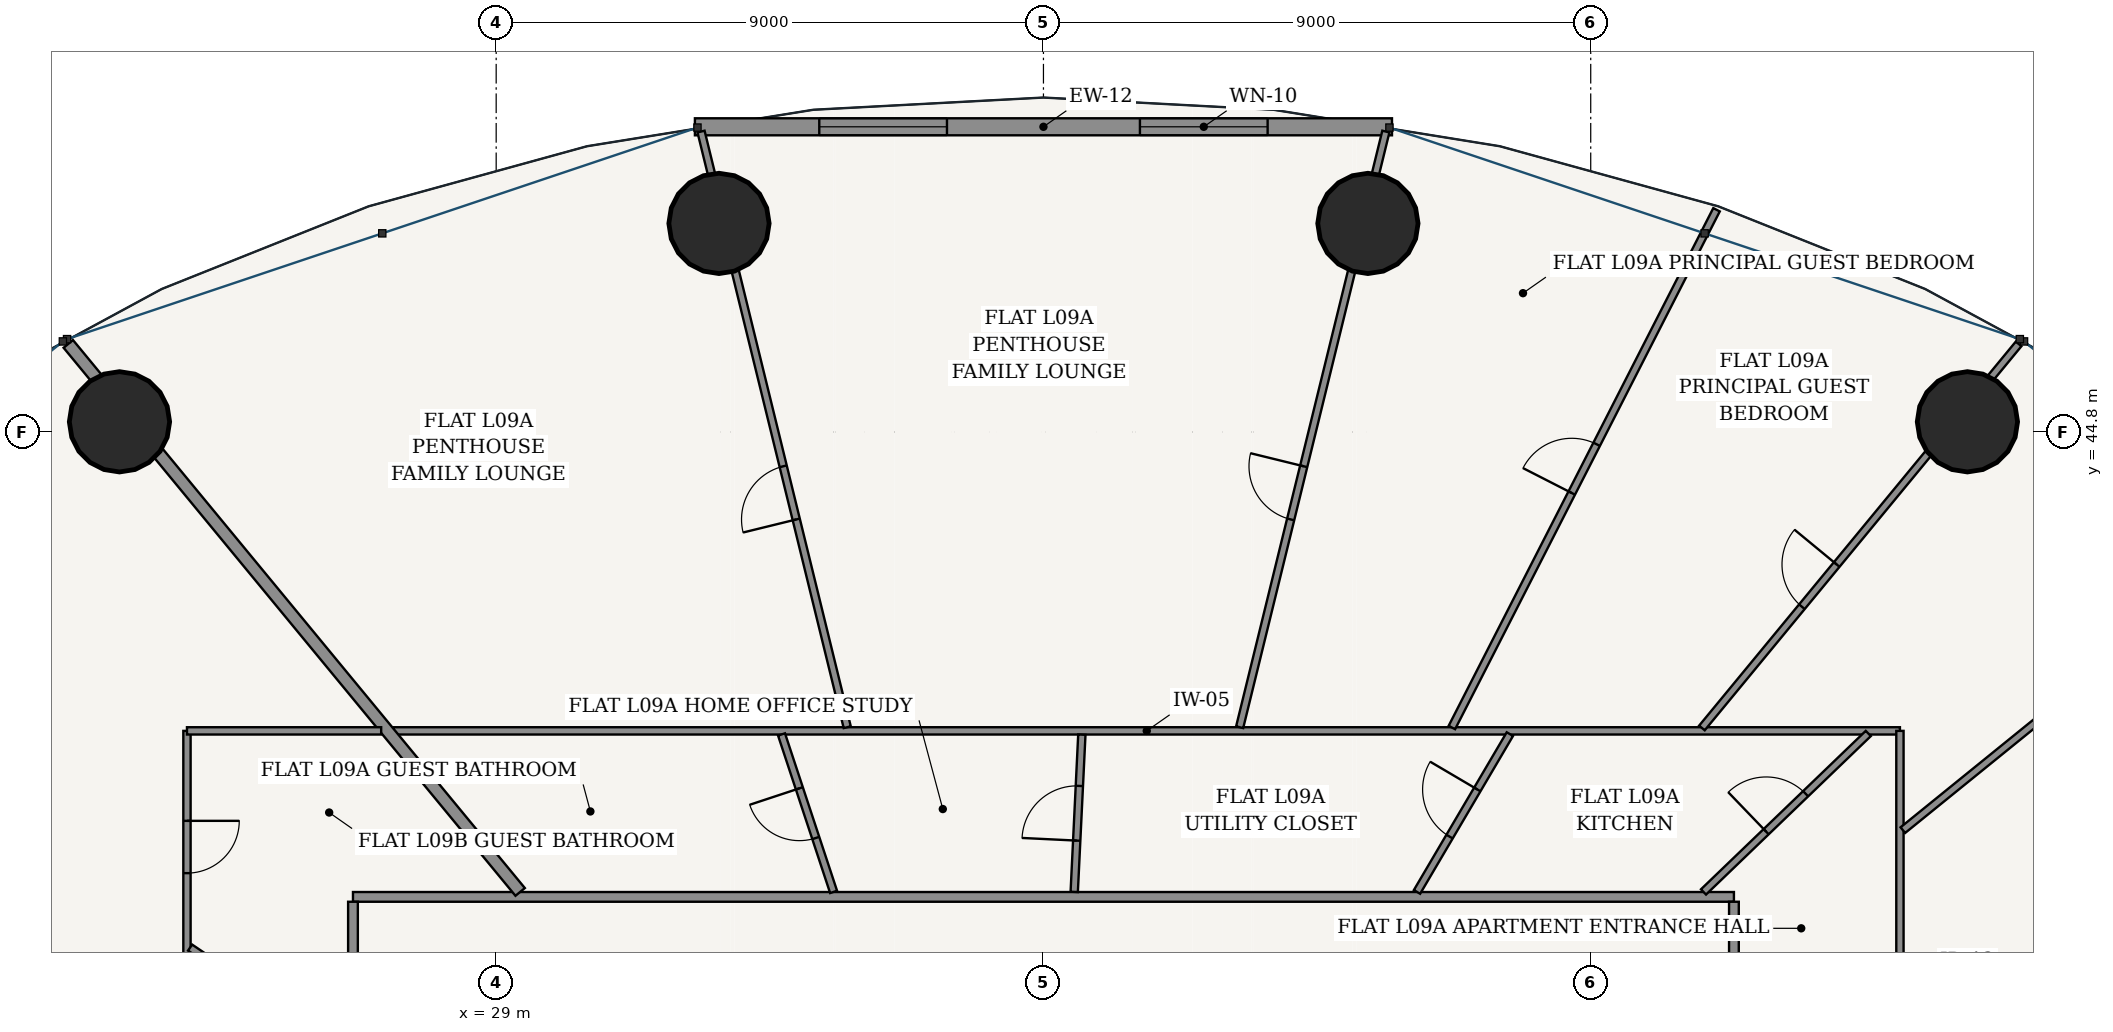
"""IFC4 building model, lengths in metres.
Left out: names, types, materials, properties, quantities, classifications, styles, units other than length and angle.
Written with IfcOpenShell. Run it as: python <this file> out.ifc"""

import sys

from ifc_helpers import new_model, si_unit, direction, frame, frame_2d, origin, origin_2d, place, context, subcontext, project, spatial, rectangle, hollow_circle, extrude, source, transform, mapped, element, fill, save


model = new_model("IFC4")
c1 = context("Model", 3, precision=1e-05, world=origin(), true_north=direction((-0.2419218956, 0.970295726276)))
c2 = subcontext(c1, "Body", "Model", "MODEL_VIEW")
j1 = project(units=[si_unit("LENGTHUNIT", "METRE"), si_unit("PLANEANGLEUNIT", "RADIAN")], contexts=[c1])
p1 = place(None, origin())
s1 = spatial("IfcSite", under=j1, at=p1, CompositionType="ELEMENT")
p2 = place(p1, origin())
s2 = spatial("IfcBuilding", under=s1, at=p2, CompositionType="ELEMENT")
p3 = place(p2, frame((0.0, 0.0, 38.4)))
s3 = spatial("IfcBuildingStorey", under=s2, at=p3, CompositionType="ELEMENT", Elevation=38.4)
for number, where, z_axis, x_axis in (
    (1, (53.195, 44.968, 0.0), (0.0, 0.0, 1.0), (1.0, 0.0, 0.0)),
    (2, (43.336, 48.23, 0.0), (0.0, 0.0, 1.0), (1.0, 0.0, 0.0)),
    (3, (32.664, 48.23, 0.0), (0.0, 0.0, 1.0), (1.0, 0.0, 0.0)),
    (4, (22.805, 44.968, 0.0), (0.0, 0.0, 1.0), (1.0, 0.0, 0.0)),
):
    element("IfcColumn", number, at=place(p3, frame(where, z_axis=z_axis, x_axis=x_axis)), inside=s3, PredefinedType="COLUMN", context=c2, shape_type="SweptSolid", body=[
        extrude(hollow_circle(Radius=0.825, WallThickness=0.05, at=origin_2d()), origin(), (0.0, 0.0, 1.0), 3.6),
    ])
p4 = place(p3, frame((43.732, 49.819, 0.0), z_axis=(0.0, 0.0, 1.0), x_axis=(-1.0, 0.0, 0.0)))
e5 = element("IfcWall", 5, at=p4, inside=s3, PredefinedType="SOLIDWALL", context=c2, shape_type="SweptSolid", body=[
    extrude(rectangle(XDim=11.463, YDim=0.28, at=frame_2d((5.732, 0.0))), origin(), (0.0, 0.0, 1.0), 3.32),
])
p5 = place(p4, frame((2.045, 0.0, 0.85)))
e6 = element("IfcOpeningElement", 6, at=p5, cuts=e5, PredefinedType="OPENING", context=c2, shape_type="SweptSolid", body=[
    extrude(rectangle(XDim=2.1, YDim=1.95, at=frame_2d((1.05, 0.975))), frame((0.0, 0.15, 0.0), z_axis=(0.0, -1.0, 0.0), x_axis=(1.0, 0.0, 0.0)), (0.0, 0.0, 1.0), 0.3),
])
p6 = place(p4, frame((7.318, 0.0, 0.85)))
e7 = element("IfcOpeningElement", 7, at=p6, cuts=e5, PredefinedType="OPENING", context=c2, shape_type="SweptSolid", body=[
    extrude(rectangle(XDim=2.1, YDim=1.95, at=frame_2d((1.05, 0.975))), frame((0.0, 0.15, 0.0), z_axis=(0.0, -1.0, 0.0), x_axis=(1.0, 0.0, 0.0)), (0.0, 0.0, 1.0), 0.3),
])
p7 = place(p3, frame((26.645, 37.155, 0.0), z_axis=(0.0, 0.0, 1.0), x_axis=(1.0, 0.0, 0.0)))
e8 = element("IfcWall", 8, at=p7, inside=s3, PredefinedType="PARTITIONING", context=c2, shape_type="SweptSolid", body=[
    extrude(rectangle(XDim=22.71, YDim=0.16, at=frame_2d((11.355, 0.0))), origin(), (0.0, 0.0, 1.0), 2.688),
])
p8 = place(p3, frame((26.645, 16.525, 0.0), z_axis=(0.0, 0.0, 1.0), x_axis=(0.0, 1.0, 0.0)))
e9 = element("IfcWall", 9, at=p8, inside=s3, PredefinedType="PARTITIONING", context=c2, shape_type="SweptSolid", body=[
    extrude(rectangle(XDim=20.55, YDim=0.16, at=frame_2d((10.275, 0.0))), origin(), (0.0, 0.0, 1.0), 2.688),
])
p9 = place(p8, frame((1.226, 0.0, 0.0)))
e10 = element("IfcOpeningElement", 10, at=p9, cuts=e9, PredefinedType="OPENING", context=c2, shape_type="SweptSolid", body=[
    extrude(rectangle(XDim=0.98, YDim=2.2, at=frame_2d((0.49, 1.1))), frame((0.0, 0.09, 0.0), z_axis=(0.0, -1.0, 0.0), x_axis=(1.0, 0.0, 0.0)), (0.0, 0.0, 1.0), 0.18),
])
p10 = place(p3, frame((49.355, 16.525, 0.0), z_axis=(0.0, 0.0, 1.0), x_axis=(0.0, 1.0, 0.0)))
e11 = element("IfcWall", 11, at=p10, inside=s3, PredefinedType="PARTITIONING", context=c2, shape_type="SweptSolid", body=[
    extrude(rectangle(XDim=20.55, YDim=0.16, at=frame_2d((10.275, 0.0))), origin(), (0.0, 0.0, 1.0), 2.688),
])
p11 = place(p10, frame((17.207, 0.0, 0.0)))
e12 = element("IfcOpeningElement", 12, at=p11, cuts=e11, PredefinedType="OPENING", context=c2, shape_type="SweptSolid", body=[
    extrude(rectangle(XDim=0.98, YDim=2.2, at=frame_2d((0.49, 1.1))), frame((0.0, 0.09, 0.0), z_axis=(0.0, -1.0, 0.0), x_axis=(1.0, 0.0, 0.0)), (0.0, 0.0, 1.0), 0.18),
])
p12 = place(p10, frame((1.892, 0.0, 0.0)))
e13 = element("IfcOpeningElement", 13, at=p12, cuts=e11, PredefinedType="OPENING", context=c2, shape_type="SweptSolid", body=[
    extrude(rectangle(XDim=0.98, YDim=2.2, at=frame_2d((0.49, 1.1))), frame((0.0, 0.09, 0.0), z_axis=(0.0, -1.0, 0.0), x_axis=(1.0, 0.0, 0.0)), (0.0, 0.0, 1.0), 0.18),
])
p13 = place(p3, frame((27.312, 39.885, 0.0), z_axis=(0.0, 0.0, 1.0), x_axis=(1.0, 0.0, 0.0)))
e14 = element("IfcWall", 14, at=p13, inside=s3, PredefinedType="PARTITIONING", context=c2, shape_type="SweptSolid", body=[
    extrude(rectangle(XDim=24.772, YDim=0.12, at=frame_2d((12.386, 0.0))), origin(), (0.0, 0.0, 1.0), 2.688),
])
p14 = place(p3, frame((52.085, 39.885, 0.0), z_axis=(0.0, 0.0, 1.0), x_axis=(0.0, -1.0, 0.0)))
e15 = element("IfcWall", 15, at=p14, inside=s3, PredefinedType="PARTITIONING", context=c2, shape_type="SweptSolid", body=[
    extrude(rectangle(XDim=10.713, YDim=0.12, at=frame_2d((5.356, 0.0))), origin(), (0.0, 0.0, 1.0), 2.688),
])
p15 = place(p14, frame((3.965, 0.0, 0.0)))
e16 = element("IfcOpeningElement", 16, at=p15, cuts=e15, PredefinedType="OPENING", context=c2, shape_type="SweptSolid", body=[
    extrude(rectangle(XDim=0.9, YDim=2.15, at=frame_2d((0.45, 1.075))), frame((0.0, 0.07, 0.0), z_axis=(0.0, -1.0, 0.0), x_axis=(1.0, 0.0, 0.0)), (0.0, 0.0, 1.0), 0.14),
])
p16 = place(p3, frame((52.133, 38.253, 0.0), z_axis=(0.0, 0.0, 1.0), x_axis=(0.776936623447, 0.629578814087, 0.0)))
e17 = element("IfcWall", 17, at=p16, inside=s3, PredefinedType="PARTITIONING", context=c2, shape_type="SweptSolid", body=[
    extrude(rectangle(XDim=8.136, YDim=0.12, at=frame_2d((4.068, 0.0))), origin(), (0.0, 0.0, 1.0), 2.762),
])
p17 = place(p16, frame((3.618, 0.0, 0.0)))
e18 = element("IfcOpeningElement", 18, at=p17, cuts=e17, PredefinedType="OPENING", context=c2, shape_type="SweptSolid", body=[
    extrude(rectangle(XDim=0.9, YDim=2.15, at=frame_2d((0.45, 1.075))), frame((0.0, 0.07, 0.0), z_axis=(0.0, -1.0, 0.0), x_axis=(1.0, 0.0, 0.0)), (0.0, 0.0, 1.0), 0.14),
])
p18 = place(p3, frame((48.829, 39.933, 0.0), z_axis=(0.0, 0.0, 1.0), x_axis=(0.636192172227, 0.771530634516, 0.0)))
e19 = element("IfcWall", 19, at=p18, inside=s3, PredefinedType="PARTITIONING", context=c2, shape_type="SweptSolid", body=[
    extrude(rectangle(XDim=8.186, YDim=0.12, at=frame_2d((4.093, 0.0))), origin(), (0.0, 0.0, 1.0), 2.688),
])
p19 = place(p18, frame((2.584, 0.0, 0.0)))
e20 = element("IfcOpeningElement", 20, at=p19, cuts=e19, PredefinedType="OPENING", context=c2, shape_type="SweptSolid", body=[
    extrude(rectangle(XDim=0.9, YDim=2.15, at=frame_2d((0.45, 1.075))), frame((0.0, 0.07, 0.0), z_axis=(0.0, -1.0, 0.0), x_axis=(1.0, 0.0, 0.0)), (0.0, 0.0, 1.0), 0.14),
])
p20 = place(p3, frame((44.717, 39.94, 0.0), z_axis=(0.0, 0.0, 1.0), x_axis=(0.455131303234, 0.890424335256, 0.0)))
e21 = element("IfcWall", 21, at=p20, inside=s3, PredefinedType="PARTITIONING", context=c2, shape_type="SweptSolid", body=[
    extrude(rectangle(XDim=9.562, YDim=0.12, at=frame_2d((4.781, 0.0))), origin(), (0.0, 0.0, 1.0), 2.762),
])
p21 = place(p20, frame((4.331, 0.0, 0.0)))
e22 = element("IfcOpeningElement", 22, at=p21, cuts=e21, PredefinedType="OPENING", context=c2, shape_type="SweptSolid", body=[
    extrude(rectangle(XDim=0.9, YDim=2.15, at=frame_2d((0.45, 1.075))), frame((0.0, 0.07, 0.0), z_axis=(0.0, -1.0, 0.0), x_axis=(1.0, 0.0, 0.0)), (0.0, 0.0, 1.0), 0.14),
])
p22 = place(p3, frame((41.227, 39.945, 0.0), z_axis=(0.0, 0.0, 1.0), x_axis=(0.238375747469, 0.97117300365, 0.0)))
e23 = element("IfcWall", 23, at=p22, inside=s3, PredefinedType="PARTITIONING", context=c2, shape_type="SweptSolid", body=[
    extrude(rectangle(XDim=10.086, YDim=0.12, at=frame_2d((5.043, 0.0))), origin(), (0.0, 0.0, 1.0), 2.688),
])
p23 = place(p22, frame((3.519, 0.0, 0.0)))
e24 = element("IfcOpeningElement", 24, at=p23, cuts=e23, PredefinedType="OPENING", context=c2, shape_type="SweptSolid", body=[
    extrude(rectangle(XDim=0.9, YDim=2.15, at=frame_2d((0.45, 1.075))), frame((0.0, 0.07, 0.0), z_axis=(0.0, -1.0, 0.0), x_axis=(1.0, 0.0, 0.0)), (0.0, 0.0, 1.0), 0.14),
])
p24 = place(p3, frame((34.773, 39.945, 0.0), z_axis=(0.0, 0.0, 1.0), x_axis=(-0.238375747469, 0.97117300365, 0.0)))
e25 = element("IfcWall", 25, at=p24, inside=s3, PredefinedType="PARTITIONING", context=c2, shape_type="SweptSolid", body=[
    extrude(rectangle(XDim=10.086, YDim=0.12, at=frame_2d((5.043, 0.0))), origin(), (0.0, 0.0, 1.0), 2.688),
])
p25 = place(p24, frame((3.518, 0.0, 0.0)))
e26 = element("IfcOpeningElement", 26, at=p25, cuts=e25, PredefinedType="OPENING", context=c2, shape_type="SweptSolid", body=[
    extrude(rectangle(XDim=0.9, YDim=2.15, at=frame_2d((0.45, 1.075))), frame((0.0, 0.07, 0.0), z_axis=(0.0, -1.0, 0.0), x_axis=(1.0, 0.0, 0.0)), (0.0, 0.0, 1.0), 0.14),
])
p26 = place(p3, frame((48.855, 37.236, 0.0), z_axis=(0.0, 0.0, 1.0), x_axis=(0.720835560675, 0.693106120638, 0.0)))
e27 = element("IfcWall", 27, at=p26, inside=s3, PredefinedType="PARTITIONING", context=c2, shape_type="SweptSolid", body=[
    extrude(rectangle(XDim=3.76, YDim=0.12, at=frame_2d((1.88, 0.0))), origin(), (0.0, 0.0, 1.0), 2.999),
])
p27 = place(p26, frame((1.43, 0.0, 0.0)))
e28 = element("IfcOpeningElement", 28, at=p27, cuts=e27, PredefinedType="OPENING", context=c2, shape_type="SweptSolid", body=[
    extrude(rectangle(XDim=0.9, YDim=2.15, at=frame_2d((0.45, 1.075))), frame((0.0, 0.07, 0.0), z_axis=(0.0, -1.0, 0.0), x_axis=(1.0, 0.0, 0.0)), (0.0, 0.0, 1.0), 0.14),
])
p28 = place(p3, frame((44.143, 37.237, 0.0), z_axis=(0.0, 0.0, 1.0), x_axis=(0.507275244465, 0.861784094976, 0.0)))
e29 = element("IfcWall", 29, at=p28, inside=s3, PredefinedType="PARTITIONING", context=c2, shape_type="SweptSolid", body=[
    extrude(rectangle(XDim=3.011, YDim=0.12, at=frame_2d((1.505, 0.0))), origin(), (0.0, 0.0, 1.0), 3.32),
])
p29 = place(p28, frame((1.055, 0.0, 0.0)))
e30 = element("IfcOpeningElement", 30, at=p29, cuts=e29, PredefinedType="OPENING", context=c2, shape_type="SweptSolid", body=[
    extrude(rectangle(XDim=0.9, YDim=2.15, at=frame_2d((0.45, 1.075))), frame((0.0, 0.07, 0.0), z_axis=(0.0, -1.0, 0.0), x_axis=(1.0, 0.0, 0.0)), (0.0, 0.0, 1.0), 0.14),
])
p30 = place(p3, frame((38.506, 37.237, 0.0), z_axis=(0.0, 0.0, 1.0), x_axis=(0.048376073987, 0.998829192338, 0.0)))
e31 = element("IfcWall", 31, at=p30, inside=s3, PredefinedType="PARTITIONING", context=c2, shape_type="SweptSolid", body=[
    extrude(rectangle(XDim=2.589, YDim=0.12, at=frame_2d((1.294, 0.0))), origin(), (0.0, 0.0, 1.0), 3.32),
])
p31 = place(p30, frame((0.844, 0.0, 0.0)))
e32 = element("IfcOpeningElement", 32, at=p31, cuts=e31, PredefinedType="OPENING", context=c2, shape_type="SweptSolid", body=[
    extrude(rectangle(XDim=0.9, YDim=2.15, at=frame_2d((0.45, 1.075))), frame((0.0, 0.07, 0.0), z_axis=(0.0, -1.0, 0.0), x_axis=(1.0, 0.0, 0.0)), (0.0, 0.0, 1.0), 0.14),
])
p32 = place(p3, frame((34.549, 37.237, 0.0), z_axis=(0.0, 0.0, 1.0), x_axis=(-0.313863409377, 0.949468145992, 0.0)))
e33 = element("IfcWall", 33, at=p32, inside=s3, PredefinedType="PARTITIONING", context=c2, shape_type="SweptSolid", body=[
    extrude(rectangle(XDim=2.727, YDim=0.12, at=frame_2d((1.364, 0.0))), origin(), (0.0, 0.0, 1.0), 3.32),
])
p33 = place(p32, frame((0.934, 0.0, 0.0)))
e34 = element("IfcOpeningElement", 34, at=p33, cuts=e33, PredefinedType="OPENING", context=c2, shape_type="SweptSolid", body=[
    extrude(rectangle(XDim=0.86, YDim=2.15, at=frame_2d((0.43, 1.075))), frame((0.0, 0.07, 0.0), z_axis=(0.0, -1.0, 0.0), x_axis=(1.0, 0.0, 0.0)), (0.0, 0.0, 1.0), 0.14),
])
p34 = place(p3, frame((29.395, 37.237, 0.0), z_axis=(0.0, 0.0, 1.0), x_axis=(-0.636195770442, 0.77152766747, 0.0)))
e35 = element("IfcWall", 35, at=p34, inside=s3, PredefinedType="PARTITIONING", context=c2, shape_type="SweptSolid", body=[
    extrude(rectangle(XDim=11.681, YDim=0.2, at=frame_2d((5.84, 0.0))), origin(), (0.0, 0.0, 1.0), 2.688),
])
p35 = place(p3, frame((23.915, 13.715, 0.0), z_axis=(0.0, 0.0, 1.0), x_axis=(0.0, 1.0, 0.0)))
e36 = element("IfcWall", 36, at=p35, inside=s3, PredefinedType="PARTITIONING", context=c2, shape_type="SweptSolid", body=[
    extrude(rectangle(XDim=26.17, YDim=0.12, at=frame_2d((13.085, 0.0))), origin(), (0.0, 0.0, 1.0), 2.688),
])
p36 = place(p35, frame((1.895, 0.0, 0.0)))
e37 = element("IfcOpeningElement", 37, at=p36, cuts=e36, PredefinedType="OPENING", context=c2, shape_type="SweptSolid", body=[
    extrude(rectangle(XDim=0.9, YDim=2.15, at=frame_2d((0.45, 1.075))), frame((0.0, 0.07, 0.0), z_axis=(0.0, -1.0, 0.0), x_axis=(1.0, 0.0, 0.0)), (0.0, 0.0, 1.0), 0.14),
])
p37 = place(p35, frame((11.498, 0.0, 0.0)))
e38 = element("IfcOpeningElement", 38, at=p37, cuts=e36, PredefinedType="OPENING", context=c2, shape_type="SweptSolid", body=[
    extrude(rectangle(XDim=0.9, YDim=2.15, at=frame_2d((0.45, 1.075))), frame((0.0, 0.07, 0.0), z_axis=(0.0, -1.0, 0.0), x_axis=(1.0, 0.0, 0.0)), (0.0, 0.0, 1.0), 0.14),
])
p38 = place(p35, frame((23.831, 0.0, 0.0)))
e39 = element("IfcOpeningElement", 39, at=p38, cuts=e36, PredefinedType="OPENING", context=c2, shape_type="SweptSolid", body=[
    extrude(rectangle(XDim=0.86, YDim=2.15, at=frame_2d((0.43, 1.075))), frame((0.0, 0.07, 0.0), z_axis=(0.0, -1.0, 0.0), x_axis=(1.0, 0.0, 0.0)), (0.0, 0.0, 1.0), 0.14),
])
p39 = place(p3, frame((23.915, 39.885, 0.0), z_axis=(0.0, 0.0, 1.0), x_axis=(1.0, 0.0, 0.0)))
e40 = element("IfcWall", 40, at=p39, inside=s3, PredefinedType="PARTITIONING", context=c2, shape_type="SweptSolid", body=[
    extrude(rectangle(XDim=3.194, YDim=0.12, at=frame_2d((1.597, 0.0))), origin(), (0.0, 0.0, 1.0), 2.688),
])
p40 = place(p3, frame((26.565, 34.558, 0.0), z_axis=(0.0, 0.0, 1.0), x_axis=(-0.827501574847, 0.561463394734, 0.0)))
e41 = element("IfcWall", 41, at=p40, inside=s3, PredefinedType="PARTITIONING", context=c2, shape_type="SweptSolid", body=[
    extrude(rectangle(XDim=3.14, YDim=0.12, at=frame_2d((1.57, 0.0))), origin(), (0.0, 0.0, 1.0), 3.32),
])
m1 = source(origin(), c2, "Body", "SweptSolid", [
    extrude(rectangle(XDim=2.1, YDim=1.95, at=frame_2d((1.05, 0.975))), frame((0.0, 0.03, 0.0), z_axis=(0.0, -1.0, 0.0), x_axis=(1.0, 0.0, 0.0)), (0.0, 0.0, 1.0), 0.06),
])
p41 = place(p5, origin())
e42 = element("IfcWindow", 42, at=p41, inside=s3, PartitioningType="SINGLE_PANEL", PredefinedType="WINDOW", context=c2, shape_type="MappedRepresentation", body=[
    mapped(m1, transform((0.0, 0.0, 0.0), scale=1.0)),
])
fill(e6, e42)
p42 = place(p6, origin())
e43 = element("IfcWindow", 43, at=p42, inside=s3, PartitioningType="SINGLE_PANEL", PredefinedType="WINDOW", context=c2, shape_type="MappedRepresentation", body=[
    mapped(m1, transform((0.0, 0.0, 0.0), scale=1.0)),
])
fill(e7, e43)
m2 = source(origin(), c2, "Body", "SweptSolid", [
    extrude(rectangle(XDim=0.9, YDim=2.15, at=frame_2d((0.45, 1.075))), frame((0.0, 0.025, 0.0), z_axis=(0.0, -1.0, 0.0), x_axis=(1.0, 0.0, 0.0)), (0.0, 0.0, 1.0), 0.05),
])
p43 = place(p27, origin())
e44 = element("IfcDoor", 44, at=p43, inside=s3, OperationType="SINGLE_SWING_LEFT", PredefinedType="DOOR", context=c2, shape_type="MappedRepresentation", body=[
    mapped(m2, transform((0.0, 0.0, 0.0), scale=1.0)),
])
fill(e28, e44)
p44 = place(p29, origin())
e45 = element("IfcDoor", 45, at=p44, inside=s3, OperationType="SINGLE_SWING_RIGHT", PredefinedType="DOOR", context=c2, shape_type="MappedRepresentation", body=[
    mapped(m2, transform((0.0, 0.0, 0.0), scale=1.0)),
])
fill(e30, e45)
p45 = place(p31, origin())
e46 = element("IfcDoor", 46, at=p45, inside=s3, OperationType="SINGLE_SWING_LEFT", PredefinedType="DOOR", context=c2, shape_type="MappedRepresentation", body=[
    mapped(m2, transform((0.0, 0.0, 0.0), scale=1.0)),
])
fill(e32, e46)
m3 = source(origin(), c2, "Body", "SweptSolid", [
    extrude(rectangle(XDim=0.86, YDim=2.15, at=frame_2d((0.43, 1.075))), frame((0.0, 0.025, 0.0), z_axis=(0.0, -1.0, 0.0), x_axis=(1.0, 0.0, 0.0)), (0.0, 0.0, 1.0), 0.05),
])
p46 = place(p33, origin())
e47 = element("IfcDoor", 47, at=p46, inside=s3, OperationType="SINGLE_SWING_RIGHT", PredefinedType="DOOR", context=c2, shape_type="MappedRepresentation", body=[
    mapped(m3, transform((0.0, 0.0, 0.0), scale=1.0)),
])
fill(e34, e47)
p47 = place(p19, origin())
e48 = element("IfcDoor", 48, at=p47, inside=s3, OperationType="SINGLE_SWING_RIGHT", PredefinedType="DOOR", context=c2, shape_type="MappedRepresentation", body=[
    mapped(m2, transform((0.0, 0.0, 0.0), scale=1.0)),
])
fill(e20, e48)
p48 = place(p21, origin())
e49 = element("IfcDoor", 49, at=p48, inside=s3, OperationType="SINGLE_SWING_LEFT", PredefinedType="DOOR", context=c2, shape_type="MappedRepresentation", body=[
    mapped(m2, transform((0.0, 0.0, 0.0), scale=1.0)),
])
fill(e22, e49)
p49 = place(p23, origin())
e50 = element("IfcDoor", 50, at=p49, inside=s3, OperationType="SINGLE_SWING_RIGHT", PredefinedType="DOOR", context=c2, shape_type="MappedRepresentation", body=[
    mapped(m2, transform((0.0, 0.0, 0.0), scale=1.0)),
])
fill(e24, e50)
p50 = place(p25, origin())
e51 = element("IfcDoor", 51, at=p50, inside=s3, OperationType="SINGLE_SWING_LEFT", PredefinedType="DOOR", context=c2, shape_type="MappedRepresentation", body=[
    mapped(m2, transform((0.0, 0.0, 0.0), scale=1.0)),
])
fill(e26, e51)
p51 = place(p38, frame((0.86, 0.0, 0.0), z_axis=(0.0, 0.0, 1.0), x_axis=(-1.0, 0.0, 0.0)))
e52 = element("IfcDoor", 52, at=p51, inside=s3, OperationType="SINGLE_SWING_LEFT", PredefinedType="DOOR", context=c2, shape_type="MappedRepresentation", body=[
    mapped(m3, transform((0.0, 0.0, 0.0), scale=1.0)),
])
fill(e39, e52)
save(model, sys.argv[1])
